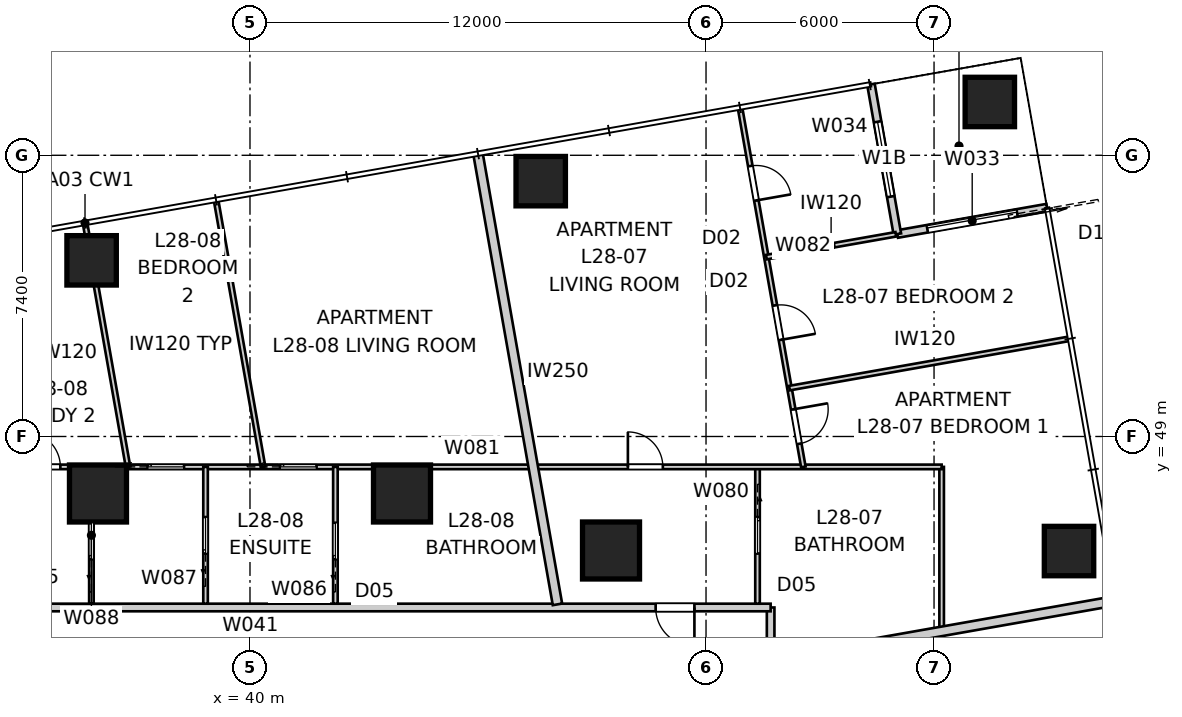
"""IFC4 building model, lengths in metres.
Left out: names, types, materials, properties, quantities, classifications, styles, units other than length and angle.
Written with IfcOpenShell. Run it as: python <this file> out.ifc"""

import sys

from ifc_helpers import new_model, si_unit, direction, frame, frame_2d, origin, origin_2d, place, context, subcontext, project, spatial, rectangle, extrude, element, fill, save


model = new_model("IFC4")
c1 = context("Model", 3, precision=1e-05, world=origin(), true_north=direction((0.0, 1.0)))
c2 = subcontext(c1, "Body", "Model", "MODEL_VIEW")
j1 = project(units=[si_unit("LENGTHUNIT", "METRE"), si_unit("PLANEANGLEUNIT", "RADIAN")], contexts=[c1])
p1 = place(None, origin())
s1 = spatial("IfcSite", under=j1, at=p1, CompositionType="ELEMENT")
p2 = place(p1, origin())
s2 = spatial("IfcBuilding", under=s1, at=p2, CompositionType="ELEMENT")
p3 = place(p2, frame((0.0, 0.0, 103.2)))
s3 = spatial("IfcBuildingStorey", under=s2, at=p3, CompositionType="ELEMENT", Elevation=103.2)
for number, where, z_axis, x_axis in (
    (1, (61.552, 45.985, 0.0), (0.0, 0.0, 1.0), (1.0, 0.0, 0.0)),
    (2, (59.468, 57.803, 0.0), (0.0, 0.0, 1.0), (1.0, 0.0, 0.0)),
    (3, (47.65, 55.719, 0.0), (0.0, 0.0, 1.0), (1.0, 0.0, 0.0)),
    (4, (35.833, 53.635, 0.0), (0.0, 0.0, 1.0), (1.0, 0.0, 0.0)),
):
    element("IfcColumn", number, at=place(p3, frame(where, z_axis=z_axis, x_axis=x_axis)), inside=s3, PredefinedType="COLUMN", context=c2, shape_type="SweptSolid", body=[
        extrude(rectangle(XDim=1.3, YDim=1.3, at=origin_2d()), origin(), (0.0, 0.0, 1.0), 3.2),
    ])
for number, where, z_axis, x_axis in (
    (5, (49.5, 46.0, 0.0), (0.0, 0.0, 1.0), (1.0, 0.0, 0.0)),
    (6, (44.0, 47.5, 0.0), (0.0, 0.0, 1.0), (1.0, 0.0, 0.0)),
    (7, (36.0, 47.5, 0.0), (0.0, 0.0, 1.0), (1.0, 0.0, 0.0)),
):
    element("IfcColumn", number, at=place(p3, frame(where, z_axis=z_axis, x_axis=x_axis)), inside=s3, PredefinedType="COLUMN", context=c2, shape_type="SweptSolid", body=[
        extrude(rectangle(XDim=1.5, YDim=1.5, at=origin_2d()), origin(), (0.0, 0.0, 1.0), 3.4),
    ])
p4 = place(p3, frame((60.974, 55.022, 0.0), z_axis=(0.0, 0.0, 1.0), x_axis=(-0.984808127031, -0.173646056486, 0.0)))
e8 = element("IfcWall", 8, at=p4, inside=s3, PredefinedType="SOLIDWALL", context=c2, shape_type="SweptSolid", body=[
    extrude(rectangle(XDim=4.0, YDim=0.2, at=frame_2d((2.0, 0.0))), origin(), (0.0, 0.0, 1.0), 3.2),
])
p5 = place(p4, frame((0.8, 0.0, 0.0)))
e9 = element("IfcOpeningElement", 9, at=p5, cuts=e8, PredefinedType="OPENING", context=c2, shape_type="SweptSolid", body=[
    extrude(rectangle(XDim=2.4, YDim=2.1, at=frame_2d((1.2, 1.05))), frame((0.0, 0.11, 0.0), z_axis=(0.0, -1.0, 0.0), x_axis=(1.0, 0.0, 0.0)), (0.0, 0.0, 1.0), 0.22),
])
p6 = place(p3, frame((57.034, 54.328, 0.0), z_axis=(0.0, 0.0, 1.0), x_axis=(-0.173646056486, 0.984808127031, 0.0)))
e10 = element("IfcWall", 10, at=p6, inside=s3, PredefinedType="SOLIDWALL", context=c2, shape_type="SweptSolid", body=[
    extrude(rectangle(XDim=4.0, YDim=0.2, at=frame_2d((2.0, 0.0))), origin(), (0.0, 0.0, 1.0), 3.2),
])
p7 = place(p6, frame((1.0, 0.0, 0.4)))
e11 = element("IfcOpeningElement", 11, at=p7, cuts=e10, PredefinedType="OPENING", context=c2, shape_type="SweptSolid", body=[
    extrude(rectangle(XDim=2.0, YDim=1.8, at=frame_2d((1.0, 0.9))), frame((0.0, 0.11, 0.0), z_axis=(0.0, -1.0, 0.0), x_axis=(1.0, 0.0, 0.0)), (0.0, 0.0, 1.0), 0.22),
])
p8 = place(p3, frame((53.7, 15.5, 0.0), z_axis=(0.0, 0.0, 1.0), x_axis=(0.0, 1.0, 0.0)))
e12 = element("IfcWall", 12, at=p8, inside=s3, PredefinedType="PARTITIONING", context=c2, shape_type="SweptSolid", body=[
    extrude(rectangle(XDim=29.0, YDim=0.2, at=frame_2d((14.5, 0.0))), origin(), (0.0, 0.0, 1.0), 3.2),
])
p9 = place(p8, frame((23.648, 0.0, 0.0)))
e13 = element("IfcOpeningElement", 13, at=p9, cuts=e12, PredefinedType="OPENING", context=c2, shape_type="SweptSolid", body=[
    extrude(rectangle(XDim=1.02, YDim=2.34, at=frame_2d((0.51, 1.17))), frame((0.0, 0.11, 0.0), z_axis=(0.0, -1.0, 0.0), x_axis=(1.0, 0.0, 0.0)), (0.0, 0.0, 1.0), 0.22),
])
p10 = place(p8, frame((2.376, 0.0, 0.0)))
e14 = element("IfcOpeningElement", 14, at=p10, cuts=e12, PredefinedType="OPENING", context=c2, shape_type="SweptSolid", body=[
    extrude(rectangle(XDim=1.02, YDim=2.0, at=frame_2d((0.51, 1.0))), frame((0.0, 0.11, 0.0), z_axis=(0.0, -1.0, 0.0), x_axis=(1.0, 0.0, 0.0)), (0.0, 0.0, 1.0), 0.22),
])
p11 = place(p8, frame((8.092, 0.0, 0.0)))
e15 = element("IfcOpeningElement", 15, at=p11, cuts=e12, PredefinedType="OPENING", context=c2, shape_type="SweptSolid", body=[
    extrude(rectangle(XDim=1.02, YDim=2.34, at=frame_2d((0.51, 1.17))), frame((0.0, 0.11, 0.0), z_axis=(0.0, -1.0, 0.0), x_axis=(1.0, 0.0, 0.0)), (0.0, 0.0, 1.0), 0.22),
])
p12 = place(p3, frame((53.7, 44.5, 0.0), z_axis=(0.0, 0.0, 1.0), x_axis=(-1.0, 0.0, 0.0)))
e16 = element("IfcWall", 16, at=p12, inside=s3, PredefinedType="PARTITIONING", context=c2, shape_type="SweptSolid", body=[
    extrude(rectangle(XDim=27.4, YDim=0.2, at=frame_2d((13.7, 0.0))), origin(), (0.0, 0.0, 1.0), 3.2),
])
p13 = place(p12, frame((24.356, 0.0, 0.0)))
e17 = element("IfcOpeningElement", 17, at=p13, cuts=e16, PredefinedType="OPENING", context=c2, shape_type="SweptSolid", body=[
    extrude(rectangle(XDim=1.02, YDim=2.0, at=frame_2d((0.51, 1.0))), frame((0.0, 0.11, 0.0), z_axis=(0.0, -1.0, 0.0), x_axis=(1.0, 0.0, 0.0)), (0.0, 0.0, 1.0), 0.22),
])
p14 = place(p12, frame((2.005, 0.0, 0.0)))
e18 = element("IfcOpeningElement", 18, at=p14, cuts=e16, PredefinedType="OPENING", context=c2, shape_type="SweptSolid", body=[
    extrude(rectangle(XDim=1.02, YDim=2.0, at=frame_2d((0.51, 1.0))), frame((0.0, 0.11, 0.0), z_axis=(0.0, -1.0, 0.0), x_axis=(1.0, 0.0, 0.0)), (0.0, 0.0, 1.0), 0.22),
])
p15 = place(p3, frame((62.797, 44.682, 0.0), z_axis=(0.0, 0.0, 1.0), x_axis=(-0.984810933893, -0.173630137029, 0.0)))
e19 = element("IfcWall", 19, at=p15, inside=s3, PredefinedType="PARTITIONING", context=c2, shape_type="SweptSolid", body=[
    extrude(rectangle(XDim=9.154, YDim=0.25, at=frame_2d((4.577, 0.0))), origin(), (0.0, 0.0, 1.0), 3.2),
])
p16 = place(p3, frame((45.999, 56.444, 0.0), z_axis=(0.0, 0.0, 1.0), x_axis=(0.173654664517, -0.984806609184, 0.0)))
e20 = element("IfcWall", 20, at=p16, inside=s3, PredefinedType="PARTITIONING", context=c2, shape_type="SweptSolid", body=[
    extrude(rectangle(XDim=12.044, YDim=0.25, at=frame_2d((6.022, 0.0))), origin(), (0.0, 0.0, 1.0), 3.2),
])
p17 = place(p3, frame((58.2, 48.2, 0.0), z_axis=(0.0, 0.0, 1.0), x_axis=(0.0, -1.0, 0.0)))
e21 = element("IfcWall", 21, at=p17, inside=s3, PredefinedType="PARTITIONING", context=c2, shape_type="SweptSolid", body=[
    extrude(rectangle(XDim=36.4, YDim=0.12, at=frame_2d((18.2, 0.0))), origin(), (0.0, 0.0, 1.0), 3.2),
])
p18 = place(p17, frame((5.671, 0.0, 0.0)))
e22 = element("IfcOpeningElement", 22, at=p18, cuts=e21, PredefinedType="OPENING", context=c2, shape_type="SweptSolid", body=[
    extrude(rectangle(XDim=0.92, YDim=2.34, at=frame_2d((0.46, 1.17))), frame((0.0, 0.07, 0.0), z_axis=(0.0, -1.0, 0.0), x_axis=(1.0, 0.0, 0.0)), (0.0, 0.0, 1.0), 0.14),
])
p19 = place(p17, frame((8.83, 0.0, 0.0)))
e23 = element("IfcOpeningElement", 23, at=p19, cuts=e21, PredefinedType="OPENING", context=c2, shape_type="SweptSolid", body=[
    extrude(rectangle(XDim=0.92, YDim=2.34, at=frame_2d((0.46, 1.17))), frame((0.0, 0.07, 0.0), z_axis=(0.0, -1.0, 0.0), x_axis=(1.0, 0.0, 0.0)), (0.0, 0.0, 1.0), 0.14),
])
p20 = place(p17, frame((28.35, 0.0, 0.0)))
e24 = element("IfcOpeningElement", 24, at=p20, cuts=e21, PredefinedType="OPENING", context=c2, shape_type="SweptSolid", body=[
    extrude(rectangle(XDim=0.92, YDim=2.34, at=frame_2d((0.46, 1.17))), frame((0.0, 0.07, 0.0), z_axis=(0.0, -1.0, 0.0), x_axis=(1.0, 0.0, 0.0)), (0.0, 0.0, 1.0), 0.14),
])
p21 = place(p17, frame((23.39, 0.0, 0.0)))
e25 = element("IfcOpeningElement", 25, at=p21, cuts=e21, PredefinedType="OPENING", context=c2, shape_type="SweptSolid", body=[
    extrude(rectangle(XDim=0.92, YDim=2.34, at=frame_2d((0.46, 1.17))), frame((0.0, 0.07, 0.0), z_axis=(0.0, -1.0, 0.0), x_axis=(1.0, 0.0, 0.0)), (0.0, 0.0, 1.0), 0.14),
])
p22 = place(p17, frame((19.918, 0.0, 0.0)))
e26 = element("IfcOpeningElement", 26, at=p22, cuts=e21, PredefinedType="OPENING", context=c2, shape_type="SweptSolid", body=[
    extrude(rectangle(XDim=0.96, YDim=2.1, at=frame_2d((0.48, 1.05))), frame((0.0, 0.07, 0.0), z_axis=(0.0, -1.0, 0.0), x_axis=(1.0, 0.0, 0.0)), (0.0, 0.0, 1.0), 0.14),
])
p23 = place(p17, frame((16.313, 0.0, 0.0)))
e27 = element("IfcOpeningElement", 27, at=p23, cuts=e21, PredefinedType="OPENING", context=c2, shape_type="SweptSolid", body=[
    extrude(rectangle(XDim=0.96, YDim=2.1, at=frame_2d((0.48, 1.05))), frame((0.0, 0.07, 0.0), z_axis=(0.0, -1.0, 0.0), x_axis=(1.0, 0.0, 0.0)), (0.0, 0.0, 1.0), 0.14),
])
p24 = place(p3, frame((53.355, 48.2, 0.0), z_axis=(0.0, 0.0, 1.0), x_axis=(0.0, -1.0, 0.0)))
e28 = element("IfcWall", 28, at=p24, inside=s3, PredefinedType="PARTITIONING", context=c2, shape_type="SweptSolid", body=[
    extrude(rectangle(XDim=3.6, YDim=0.12, at=frame_2d((1.8, 0.0))), origin(), (0.0, 0.0, 1.0), 3.2),
])
p25 = place(p24, frame((1.32, 0.0, 0.0)))
e29 = element("IfcOpeningElement", 29, at=p25, cuts=e28, PredefinedType="OPENING", context=c2, shape_type="SweptSolid", body=[
    extrude(rectangle(XDim=0.96, YDim=2.1, at=frame_2d((0.48, 1.05))), frame((0.0, 0.07, 0.0), z_axis=(0.0, -1.0, 0.0), x_axis=(1.0, 0.0, 0.0)), (0.0, 0.0, 1.0), 0.14),
])
p26 = place(p3, frame((21.8, 48.2, 0.0), z_axis=(0.0, 0.0, 1.0), x_axis=(1.0, 0.0, 0.0)))
e30 = element("IfcWall", 30, at=p26, inside=s3, PredefinedType="PARTITIONING", context=c2, shape_type="SweptSolid", body=[
    extrude(rectangle(XDim=36.4, YDim=0.12, at=frame_2d((18.2, 0.0))), origin(), (0.0, 0.0, 1.0), 3.2),
])
p27 = place(p26, frame((7.441, 0.0, 0.0)))
e31 = element("IfcOpeningElement", 31, at=p27, cuts=e30, PredefinedType="OPENING", context=c2, shape_type="SweptSolid", body=[
    extrude(rectangle(XDim=0.92, YDim=2.34, at=frame_2d((0.46, 1.17))), frame((0.0, 0.07, 0.0), z_axis=(0.0, -1.0, 0.0), x_axis=(1.0, 0.0, 0.0)), (0.0, 0.0, 1.0), 0.14),
])
p28 = place(p26, frame((28.144, 0.0, 0.0)))
e32 = element("IfcOpeningElement", 32, at=p28, cuts=e30, PredefinedType="OPENING", context=c2, shape_type="SweptSolid", body=[
    extrude(rectangle(XDim=0.92, YDim=2.34, at=frame_2d((0.46, 1.17))), frame((0.0, 0.07, 0.0), z_axis=(0.0, -1.0, 0.0), x_axis=(1.0, 0.0, 0.0)), (0.0, 0.0, 1.0), 0.14),
])
p29 = place(p26, frame((12.29, 0.0, 0.0)))
e33 = element("IfcOpeningElement", 33, at=p29, cuts=e30, PredefinedType="OPENING", context=c2, shape_type="SweptSolid", body=[
    extrude(rectangle(XDim=0.92, YDim=2.34, at=frame_2d((0.46, 1.17))), frame((0.0, 0.07, 0.0), z_axis=(0.0, -1.0, 0.0), x_axis=(1.0, 0.0, 0.0)), (0.0, 0.0, 1.0), 0.14),
])
p30 = place(p26, frame((15.505, 0.0, 0.0)))
e34 = element("IfcOpeningElement", 34, at=p30, cuts=e30, PredefinedType="OPENING", context=c2, shape_type="SweptSolid", body=[
    extrude(rectangle(XDim=0.96, YDim=2.1, at=frame_2d((0.48, 1.05))), frame((0.0, 0.07, 0.0), z_axis=(0.0, -1.0, 0.0), x_axis=(1.0, 0.0, 0.0)), (0.0, 0.0, 1.0), 0.14),
])
p31 = place(p26, frame((18.991, 0.0, 0.0)))
e35 = element("IfcOpeningElement", 35, at=p31, cuts=e30, PredefinedType="OPENING", context=c2, shape_type="SweptSolid", body=[
    extrude(rectangle(XDim=0.96, YDim=2.1, at=frame_2d((0.48, 1.05))), frame((0.0, 0.07, 0.0), z_axis=(0.0, -1.0, 0.0), x_axis=(1.0, 0.0, 0.0)), (0.0, 0.0, 1.0), 0.14),
])
p32 = place(p3, frame((52.9, 57.62, 0.0), z_axis=(0.0, 0.0, 1.0), x_axis=(0.173642635155, -0.984808730291, 0.0)))
e36 = element("IfcWall", 36, at=p32, inside=s3, PredefinedType="PARTITIONING", context=c2, shape_type="SweptSolid", body=[
    extrude(rectangle(XDim=9.565, YDim=0.12, at=frame_2d((4.782, 0.0))), origin(), (0.0, 0.0, 1.0), 3.2),
])
p33 = place(p32, frame((1.525, 0.0, 0.0)))
e37 = element("IfcOpeningElement", 37, at=p33, cuts=e36, PredefinedType="OPENING", context=c2, shape_type="SweptSolid", body=[
    extrude(rectangle(XDim=0.92, YDim=2.34, at=frame_2d((0.46, 1.17))), frame((0.0, 0.07, 0.0), z_axis=(0.0, -1.0, 0.0), x_axis=(1.0, 0.0, 0.0)), (0.0, 0.0, 1.0), 0.14),
])
p34 = place(p32, frame((5.25, 0.0, 0.0)))
e38 = element("IfcOpeningElement", 38, at=p34, cuts=e36, PredefinedType="OPENING", context=c2, shape_type="SweptSolid", body=[
    extrude(rectangle(XDim=0.92, YDim=2.34, at=frame_2d((0.46, 1.17))), frame((0.0, 0.07, 0.0), z_axis=(0.0, -1.0, 0.0), x_axis=(1.0, 0.0, 0.0)), (0.0, 0.0, 1.0), 0.14),
])
p35 = place(p32, frame((8.028, 0.0, 0.0)))
e39 = element("IfcOpeningElement", 39, at=p35, cuts=e36, PredefinedType="OPENING", context=c2, shape_type="SweptSolid", body=[
    extrude(rectangle(XDim=0.92, YDim=2.0, at=frame_2d((0.46, 1.0))), frame((0.0, 0.07, 0.0), z_axis=(0.0, -1.0, 0.0), x_axis=(1.0, 0.0, 0.0)), (0.0, 0.0, 1.0), 0.14),
])
p36 = place(p3, frame((54.195, 50.273, 0.0), z_axis=(0.0, 0.0, 1.0), x_axis=(0.984807929323, 0.173647177755, 0.0)))
e40 = element("IfcWall", 40, at=p36, inside=s3, PredefinedType="PARTITIONING", context=c2, shape_type="SweptSolid", body=[
    extrude(rectangle(XDim=7.46, YDim=0.12, at=frame_2d((3.73, 0.0))), origin(), (0.0, 0.0, 1.0), 3.2),
])
p37 = place(p3, frame((53.588, 53.72, 0.0), z_axis=(0.0, 0.0, 1.0), x_axis=(0.984805572884, 0.173660541335, 0.0)))
e41 = element("IfcWall", 41, at=p37, inside=s3, PredefinedType="PARTITIONING", context=c2, shape_type="SweptSolid", body=[
    extrude(rectangle(XDim=3.46, YDim=0.12, at=frame_2d((1.73, 0.0))), origin(), (0.0, 0.0, 1.0), 3.2),
])
p38 = place(p3, frame((42.248, 44.6, 0.0), z_axis=(0.0, 0.0, 1.0), x_axis=(0.0, 1.0, 0.0)))
e42 = element("IfcWall", 42, at=p38, inside=s3, PredefinedType="PARTITIONING", context=c2, shape_type="SweptSolid", body=[
    extrude(rectangle(XDim=3.6, YDim=0.12, at=frame_2d((1.8, 0.0))), origin(), (0.0, 0.0, 1.0), 3.2),
])
p39 = place(p38, frame((1.17, 0.0, 0.0)))
e43 = element("IfcOpeningElement", 43, at=p39, cuts=e42, PredefinedType="OPENING", context=c2, shape_type="SweptSolid", body=[
    extrude(rectangle(XDim=0.96, YDim=2.1, at=frame_2d((0.48, 1.05))), frame((0.0, 0.07, 0.0), z_axis=(0.0, -1.0, 0.0), x_axis=(1.0, 0.0, 0.0)), (0.0, 0.0, 1.0), 0.14),
])
p40 = place(p3, frame((38.831, 44.6, 0.0), z_axis=(0.0, 0.0, 1.0), x_axis=(0.0, 1.0, 0.0)))
e44 = element("IfcWall", 44, at=p40, inside=s3, PredefinedType="PARTITIONING", context=c2, shape_type="SweptSolid", body=[
    extrude(rectangle(XDim=3.6, YDim=0.12, at=frame_2d((1.8, 0.0))), origin(), (0.0, 0.0, 1.0), 2.588),
])
p41 = place(p40, frame((1.32, 0.0, 0.0)))
e45 = element("IfcOpeningElement", 45, at=p41, cuts=e44, PredefinedType="OPENING", context=c2, shape_type="SweptSolid", body=[
    extrude(rectangle(XDim=0.96, YDim=2.1, at=frame_2d((0.48, 1.05))), frame((0.0, 0.07, 0.0), z_axis=(0.0, -1.0, 0.0), x_axis=(1.0, 0.0, 0.0)), (0.0, 0.0, 1.0), 0.14),
])
p42 = place(p3, frame((35.827, 44.6, 0.0), z_axis=(0.0, 0.0, 1.0), x_axis=(0.0, 1.0, 0.0)))
e46 = element("IfcWall", 46, at=p42, inside=s3, PredefinedType="PARTITIONING", context=c2, shape_type="SweptSolid", body=[
    extrude(rectangle(XDim=3.6, YDim=0.12, at=frame_2d((1.8, 0.0))), origin(), (0.0, 0.0, 1.0), 3.2),
])
p43 = place(p42, frame((1.17, 0.0, 0.0)))
e47 = element("IfcOpeningElement", 47, at=p43, cuts=e46, PredefinedType="OPENING", context=c2, shape_type="SweptSolid", body=[
    extrude(rectangle(XDim=0.96, YDim=2.1, at=frame_2d((0.48, 1.05))), frame((0.0, 0.07, 0.0), z_axis=(0.0, -1.0, 0.0), x_axis=(1.0, 0.0, 0.0)), (0.0, 0.0, 1.0), 0.14),
])
p44 = place(p3, frame((40.345, 48.2, 0.0), z_axis=(0.0, 0.0, 1.0), x_axis=(-0.17363617165, 0.984809869921, 0.0)))
e48 = element("IfcWall", 48, at=p44, inside=s3, PredefinedType="PARTITIONING", context=c2, shape_type="SweptSolid", body=[
    extrude(rectangle(XDim=7.096, YDim=0.12, at=frame_2d((3.548, 0.0))), origin(), (0.0, 0.0, 1.0), 3.2),
])
p45 = place(p3, frame((36.791, 48.2, 0.0), z_axis=(0.0, 0.0, 1.0), x_axis=(-0.173630564586, 0.984810858511, 0.0)))
e49 = element("IfcWall", 49, at=p45, inside=s3, PredefinedType="PARTITIONING", context=c2, shape_type="SweptSolid", body=[
    extrude(rectangle(XDim=6.479, YDim=0.12, at=frame_2d((3.24, 0.0))), origin(), (0.0, 0.0, 1.0), 3.2),
])
p46 = place(p5, origin())
e50 = element("IfcDoor", 50, at=p46, inside=s3, OperationType="SLIDING_TO_LEFT", PredefinedType="DOOR", context=c2, shape_type="SweptSolid", body=[
    extrude(rectangle(XDim=2.4, YDim=2.1, at=frame_2d((1.2, 1.05))), frame((0.0, 0.025, 0.0), z_axis=(0.0, -1.0, 0.0), x_axis=(1.0, 0.0, 0.0)), (0.0, 0.0, 1.0), 0.05),
])
fill(e9, e50)
p47 = place(p7, origin())
e51 = element("IfcWindow", 51, at=p47, inside=s3, PartitioningType="SINGLE_PANEL", PredefinedType="WINDOW", context=c2, shape_type="SweptSolid", body=[
    extrude(rectangle(XDim=2.0, YDim=1.8, at=frame_2d((1.0, 0.9))), frame((0.0, 0.03, 0.0), z_axis=(0.0, -1.0, 0.0), x_axis=(1.0, 0.0, 0.0)), (0.0, 0.0, 1.0), 0.06),
])
fill(e11, e51)
p48 = place(p14, origin())
e52 = element("IfcDoor", 52, at=p48, inside=s3, OperationType="SINGLE_SWING_LEFT", PredefinedType="DOOR", context=c2, shape_type="SweptSolid", body=[
    extrude(rectangle(XDim=1.02, YDim=2.0, at=frame_2d((0.51, 1.0))), frame((0.0, 0.025, 0.0), z_axis=(0.0, -1.0, 0.0), x_axis=(1.0, 0.0, 0.0)), (0.0, 0.0, 1.0), 0.05),
])
fill(e18, e52)
p49 = place(p28, origin())
e53 = element("IfcDoor", 53, at=p49, inside=s3, OperationType="SINGLE_SWING_LEFT", PredefinedType="DOOR", context=c2, shape_type="SweptSolid", body=[
    extrude(rectangle(XDim=0.92, YDim=2.34, at=frame_2d((0.46, 1.17))), frame((0.0, 0.025, 0.0), z_axis=(0.0, -1.0, 0.0), x_axis=(1.0, 0.0, 0.0)), (0.0, 0.0, 1.0), 0.05),
])
fill(e32, e53)
p50 = place(p25, origin())
e54 = element("IfcDoor", 54, at=p50, inside=s3, OperationType="SLIDING_TO_LEFT", PredefinedType="DOOR", context=c2, shape_type="SweptSolid", body=[
    extrude(rectangle(XDim=0.96, YDim=2.1, at=frame_2d((0.48, 1.05))), frame((0.0, 0.025, 0.0), z_axis=(0.0, -1.0, 0.0), x_axis=(1.0, 0.0, 0.0)), (0.0, 0.0, 1.0), 0.05),
])
fill(e29, e54)
p51 = place(p43, origin())
e55 = element("IfcDoor", 55, at=p51, inside=s3, OperationType="SLIDING_TO_LEFT", PredefinedType="DOOR", context=c2, shape_type="SweptSolid", body=[
    extrude(rectangle(XDim=0.96, YDim=2.1, at=frame_2d((0.48, 1.05))), frame((0.0, 0.025, 0.0), z_axis=(0.0, -1.0, 0.0), x_axis=(1.0, 0.0, 0.0)), (0.0, 0.0, 1.0), 0.05),
])
fill(e47, e55)
p52 = place(p29, origin())
e56 = element("IfcDoor", 56, at=p52, inside=s3, OperationType="SINGLE_SWING_LEFT", PredefinedType="DOOR", context=c2, shape_type="SweptSolid", body=[
    extrude(rectangle(XDim=0.92, YDim=2.34, at=frame_2d((0.46, 1.17))), frame((0.0, 0.025, 0.0), z_axis=(0.0, -1.0, 0.0), x_axis=(1.0, 0.0, 0.0)), (0.0, 0.0, 1.0), 0.05),
])
fill(e33, e56)
p53 = place(p33, origin())
e57 = element("IfcDoor", 57, at=p53, inside=s3, OperationType="SINGLE_SWING_RIGHT", PredefinedType="DOOR", context=c2, shape_type="SweptSolid", body=[
    extrude(rectangle(XDim=0.92, YDim=2.34, at=frame_2d((0.46, 1.17))), frame((0.0, 0.025, 0.0), z_axis=(0.0, -1.0, 0.0), x_axis=(1.0, 0.0, 0.0)), (0.0, 0.0, 1.0), 0.05),
])
fill(e37, e57)
p54 = place(p34, origin())
e58 = element("IfcDoor", 58, at=p54, inside=s3, OperationType="SINGLE_SWING_RIGHT", PredefinedType="DOOR", context=c2, shape_type="SweptSolid", body=[
    extrude(rectangle(XDim=0.92, YDim=2.34, at=frame_2d((0.46, 1.17))), frame((0.0, 0.025, 0.0), z_axis=(0.0, -1.0, 0.0), x_axis=(1.0, 0.0, 0.0)), (0.0, 0.0, 1.0), 0.05),
])
fill(e38, e58)
p55 = place(p35, origin())
e59 = element("IfcDoor", 59, at=p55, inside=s3, OperationType="SINGLE_SWING_LEFT", PredefinedType="DOOR", context=c2, shape_type="SweptSolid", body=[
    extrude(rectangle(XDim=0.92, YDim=2.0, at=frame_2d((0.46, 1.0))), frame((0.0, 0.025, 0.0), z_axis=(0.0, -1.0, 0.0), x_axis=(1.0, 0.0, 0.0)), (0.0, 0.0, 1.0), 0.05),
])
fill(e39, e59)
p56 = place(p41, origin())
e60 = element("IfcDoor", 60, at=p56, inside=s3, OperationType="SLIDING_TO_LEFT", PredefinedType="DOOR", context=c2, shape_type="SweptSolid", body=[
    extrude(rectangle(XDim=0.96, YDim=2.1, at=frame_2d((0.48, 1.05))), frame((0.0, 0.025, 0.0), z_axis=(0.0, -1.0, 0.0), x_axis=(1.0, 0.0, 0.0)), (0.0, 0.0, 1.0), 0.05),
])
fill(e45, e60)
p57 = place(p30, origin())
e61 = element("IfcDoor", 61, at=p57, inside=s3, OperationType="SLIDING_TO_LEFT", PredefinedType="DOOR", context=c2, shape_type="SweptSolid", body=[
    extrude(rectangle(XDim=0.96, YDim=2.1, at=frame_2d((0.48, 1.05))), frame((0.0, 0.025, 0.0), z_axis=(0.0, -1.0, 0.0), x_axis=(1.0, 0.0, 0.0)), (0.0, 0.0, 1.0), 0.05),
])
fill(e34, e61)
p58 = place(p39, origin())
e62 = element("IfcDoor", 62, at=p58, inside=s3, OperationType="SLIDING_TO_LEFT", PredefinedType="DOOR", context=c2, shape_type="SweptSolid", body=[
    extrude(rectangle(XDim=0.96, YDim=2.1, at=frame_2d((0.48, 1.05))), frame((0.0, 0.025, 0.0), z_axis=(0.0, -1.0, 0.0), x_axis=(1.0, 0.0, 0.0)), (0.0, 0.0, 1.0), 0.05),
])
fill(e43, e62)
p59 = place(p31, origin())
e63 = element("IfcDoor", 63, at=p59, inside=s3, OperationType="SLIDING_TO_LEFT", PredefinedType="DOOR", context=c2, shape_type="SweptSolid", body=[
    extrude(rectangle(XDim=0.96, YDim=2.1, at=frame_2d((0.48, 1.05))), frame((0.0, 0.025, 0.0), z_axis=(0.0, -1.0, 0.0), x_axis=(1.0, 0.0, 0.0)), (0.0, 0.0, 1.0), 0.05),
])
fill(e35, e63)
save(model, sys.argv[1])
